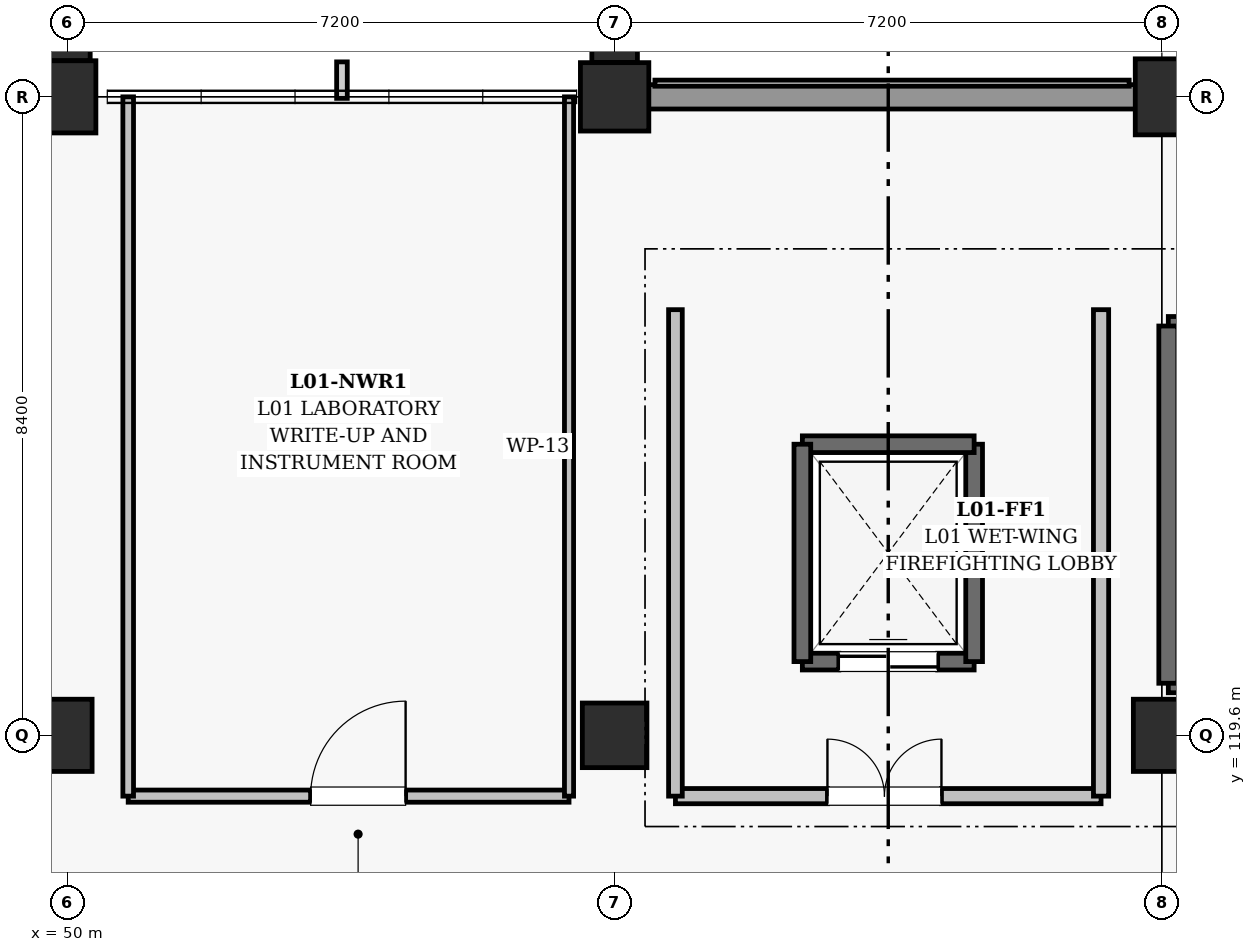
"""IFC4 building model, lengths in metres.
Left out: names, types, materials, properties, quantities, classifications, styles, units other than length and angle.
Written with IfcOpenShell. Run it as: python <this file> out.ifc"""

import sys

from ifc_helpers import new_model, si_unit, direction, frame, frame_2d, origin, origin_2d, place, context, subcontext, project, spatial, rectangle, extrude, element, fill, save


model = new_model("IFC4")
c1 = context("Model", 3, precision=1e-05, world=origin(), true_north=direction((0.0, 1.0)))
c2 = subcontext(c1, "Body", "Model", "MODEL_VIEW")
j1 = project(units=[si_unit("LENGTHUNIT", "METRE"), si_unit("PLANEANGLEUNIT", "RADIAN")], contexts=[c1])
p1 = place(None, origin())
s1 = spatial("IfcSite", under=j1, at=p1, CompositionType="ELEMENT")
p2 = place(p1, origin())
s2 = spatial("IfcBuilding", under=s1, at=p2, CompositionType="ELEMENT")
p3 = place(p2, frame((0.0, 0.0, 5.4)))
s3 = spatial("IfcBuildingStorey", under=s2, at=p3, CompositionType="ELEMENT", Elevation=5.4)
p4 = place(p3, frame((50.0, 119.6, 0.0), z_axis=(0.0, 0.0, 1.0), x_axis=(1.0, 0.0, 0.0)))
e1 = element("IfcColumn", 1, at=p4, inside=s3, PredefinedType="COLUMN", context=c2, shape_type="SweptSolid", body=[
    extrude(rectangle(XDim=0.65, YDim=0.95, at=origin_2d()), origin(), (0.0, 0.0, 1.0), 4.5),
])
p5 = place(p3, frame((50.0, 128.0, 0.0), z_axis=(0.0, 0.0, 1.0), x_axis=(1.0, 0.0, 0.0)))
e2 = element("IfcColumn", 2, at=p5, inside=s3, PredefinedType="COLUMN", context=c2, shape_type="SweptSolid", body=[
    extrude(rectangle(XDim=0.75, YDim=0.95, at=origin_2d()), origin(), (0.0, 0.0, 1.0), 4.5),
])
p6 = place(p3, frame((57.2, 119.6, 0.0), z_axis=(0.0, 0.0, 1.0), x_axis=(1.0, 0.0, 0.0)))
e3 = element("IfcColumn", 3, at=p6, inside=s3, PredefinedType="COLUMN", context=c2, shape_type="SweptSolid", body=[
    extrude(rectangle(XDim=0.85, YDim=0.85, at=origin_2d()), origin(), (0.0, 0.0, 1.0), 4.5),
])
p7 = place(p3, frame((57.2, 128.0, 0.0), z_axis=(0.0, 0.0, 1.0), x_axis=(1.0, 0.0, 0.0)))
e4 = element("IfcColumn", 4, at=p7, inside=s3, PredefinedType="COLUMN", context=c2, shape_type="SweptSolid", body=[
    extrude(rectangle(XDim=0.9, YDim=0.9, at=origin_2d()), origin(), (0.0, 0.0, 1.0), 4.5),
])
p8 = place(p3, frame((64.4, 119.6, 0.0), z_axis=(0.0, 0.0, 1.0), x_axis=(1.0, 0.0, 0.0)))
e5 = element("IfcColumn", 5, at=p8, inside=s3, PredefinedType="COLUMN", context=c2, shape_type="SweptSolid", body=[
    extrude(rectangle(XDim=0.75, YDim=0.95, at=origin_2d()), origin(), (0.0, 0.0, 1.0), 4.5),
])
p9 = place(p3, frame((64.4, 128.0, 0.0), z_axis=(0.0, 0.0, 1.0), x_axis=(1.0, 0.0, 0.0)))
e6 = element("IfcColumn", 6, at=p9, inside=s3, PredefinedType="COLUMN", context=c2, shape_type="SweptSolid", body=[
    extrude(rectangle(XDim=0.7, YDim=1.0, at=origin_2d()), origin(), (0.0, 0.0, 1.0), 4.5),
])
for number, where, z_axis, x_axis in (
    (7, (50.0, 128.903, 0.0), (0.0, 0.0, 1.0), (1.0, 0.0, 0.0)),
    (8, (57.2, 128.878, 0.0), (0.0, 0.0, 1.0), (1.0, 0.0, 0.0)),
):
    element("IfcColumn", number, at=place(p3, frame(where, z_axis=z_axis, x_axis=x_axis)), inside=s3, PredefinedType="PILASTER", context=c2, shape_type="SweptSolid", body=[
        extrude(rectangle(XDim=0.6, YDim=0.85, at=origin_2d()), origin(), (0.0, 0.0, 1.0), 4.5),
    ])
p10 = place(p3, frame((57.63, 128.0, 0.0), z_axis=(0.0, 0.0, 1.0), x_axis=(1.0, 0.0, 0.0)))
e9 = element("IfcWall", 9, at=p10, inside=s3, PredefinedType="SOLIDWALL", context=c2, shape_type="SweptSolid", body=[
    extrude(rectangle(XDim=6.44, YDim=0.32, at=frame_2d((3.22, 0.0))), origin(), (0.0, 0.0, 1.0), 3.455),
])
p11 = place(p3, frame((64.485, 120.285, 0.0), z_axis=(0.0, 0.0, 1.0), x_axis=(1.0, 0.0, 0.0)))
e10 = element("IfcWall", 10, at=p11, inside=s3, PredefinedType="SHEAR", context=c2, shape_type="SweptSolid", body=[
    extrude(rectangle(XDim=10.63, YDim=0.25, at=frame_2d((5.315, 0.0))), origin(), (0.0, 0.0, 1.0), 4.175),
])
p12 = place(p11, frame((0.55, 0.0, 0.0)))
e11 = element("IfcOpeningElement", 11, at=p12, cuts=e10, PredefinedType="OPENING", context=c2, shape_type="SweptSolid", body=[
    extrude(rectangle(XDim=1.2, YDim=2.15, at=frame_2d((0.6, 1.075))), frame((0.0, 0.135, 0.0), z_axis=(0.0, -1.0, 0.0), x_axis=(1.0, 0.0, 0.0)), (0.0, 0.0, 1.0), 0.27),
])
p13 = place(p3, frame((75.115, 124.985, 0.0), z_axis=(0.0, 0.0, 1.0), x_axis=(-1.0, 0.0, 0.0)))
e12 = element("IfcWall", 12, at=p13, inside=s3, PredefinedType="SHEAR", context=c2, shape_type="SweptSolid", body=[
    extrude(rectangle(XDim=10.63, YDim=0.25, at=frame_2d((5.315, 0.0))), origin(), (0.0, 0.0, 1.0), 4.175),
])
p14 = place(p3, frame((64.485, 124.985, 0.0), z_axis=(0.0, 0.0, 1.0), x_axis=(0.0, -1.0, 0.0)))
e13 = element("IfcWall", 13, at=p14, inside=s3, PredefinedType="SHEAR", context=c2, shape_type="SweptSolid", body=[
    extrude(rectangle(XDim=4.7, YDim=0.25, at=frame_2d((2.35, 0.0))), origin(), (0.0, 0.0, 1.0), 4.175),
])
p15 = place(p3, frame((59.67, 120.57, 0.0), z_axis=(0.0, 0.0, 1.0), x_axis=(1.0, 0.0, 0.0)))
e14 = element("IfcWall", 14, at=p15, inside=s3, PredefinedType="SHEAR", context=c2, shape_type="SweptSolid", body=[
    extrude(rectangle(XDim=2.26, YDim=0.22, at=frame_2d((1.13, 0.0))), origin(), (0.0, 0.0, 1.0), 4.175),
])
p16 = place(p15, frame((0.48, 0.0, 0.0)))
e15 = element("IfcOpeningElement", 15, at=p16, cuts=e14, PredefinedType="OPENING", context=c2, shape_type="SweptSolid", body=[
    extrude(rectangle(XDim=1.3, YDim=2.2, at=frame_2d((0.65, 1.1))), frame((0.0, 0.12, 0.0), z_axis=(0.0, -1.0, 0.0), x_axis=(1.0, 0.0, 0.0)), (0.0, 0.0, 1.0), 0.24),
])
p17 = place(p3, frame((61.93, 120.57, 0.0), z_axis=(0.0, 0.0, 1.0), x_axis=(0.0, 1.0, 0.0)))
e16 = element("IfcWall", 16, at=p17, inside=s3, PredefinedType="SHEAR", context=c2, shape_type="SweptSolid", body=[
    extrude(rectangle(XDim=2.86, YDim=0.22, at=frame_2d((1.43, 0.0))), origin(), (0.0, 0.0, 1.0), 4.175),
])
p18 = place(p3, frame((61.93, 123.43, 0.0), z_axis=(0.0, 0.0, 1.0), x_axis=(-1.0, 0.0, 0.0)))
e17 = element("IfcWall", 17, at=p18, inside=s3, PredefinedType="SHEAR", context=c2, shape_type="SweptSolid", body=[
    extrude(rectangle(XDim=2.26, YDim=0.22, at=frame_2d((1.13, 0.0))), origin(), (0.0, 0.0, 1.0), 4.175),
])
p19 = place(p3, frame((59.67, 123.43, 0.0), z_axis=(0.0, 0.0, 1.0), x_axis=(0.0, -1.0, 0.0)))
e18 = element("IfcWall", 18, at=p19, inside=s3, PredefinedType="SHEAR", context=c2, shape_type="SweptSolid", body=[
    extrude(rectangle(XDim=2.86, YDim=0.22, at=frame_2d((1.43, 0.0))), origin(), (0.0, 0.0, 1.0), 4.175),
])
p20 = place(p3, frame((58.0, 118.8, 0.0), z_axis=(0.0, 0.0, 1.0), x_axis=(1.0, 0.0, 0.0)))
e19 = element("IfcWall", 19, at=p20, inside=s3, PredefinedType="SOLIDWALL", context=c2, shape_type="SweptSolid", body=[
    extrude(rectangle(XDim=5.6, YDim=0.2, at=frame_2d((2.8, 0.0))), origin(), (0.0, 0.0, 1.0), 3.54),
])
p21 = place(p20, frame((2.0, 0.0, 0.0)))
e20 = element("IfcOpeningElement", 20, at=p21, cuts=e19, PredefinedType="OPENING", context=c2, shape_type="SweptSolid", body=[
    extrude(rectangle(XDim=1.5, YDim=2.2, at=frame_2d((0.75, 1.1))), frame((0.0, 0.11, 0.0), z_axis=(0.0, -1.0, 0.0), x_axis=(1.0, 0.0, 0.0)), (0.0, 0.0, 1.0), 0.22),
])
p22 = place(p3, frame((58.0, 118.8, 0.0), z_axis=(0.0, 0.0, 1.0), x_axis=(0.0, 1.0, 0.0)))
e21 = element("IfcWall", 21, at=p22, inside=s3, PredefinedType="SOLIDWALL", context=c2, shape_type="SweptSolid", body=[
    extrude(rectangle(XDim=6.4, YDim=0.18, at=frame_2d((3.2, 0.0))), origin(), (0.0, 0.0, 1.0), 3.36),
])
p23 = place(p3, frame((63.6, 118.8, 0.0), z_axis=(0.0, 0.0, 1.0), x_axis=(0.0, 1.0, 0.0)))
e22 = element("IfcWall", 22, at=p23, inside=s3, PredefinedType="SOLIDWALL", context=c2, shape_type="SweptSolid", body=[
    extrude(rectangle(XDim=6.4, YDim=0.2, at=frame_2d((3.2, 0.0))), origin(), (0.0, 0.0, 1.0), 3.36),
])
p24 = place(p3, frame((50.8, 118.8, 0.0), z_axis=(0.0, 0.0, 1.0), x_axis=(1.0, 0.0, 0.0)))
e23 = element("IfcWall", 23, at=p24, inside=s3, PredefinedType="PARTITIONING", context=c2, shape_type="SweptSolid", body=[
    extrude(rectangle(XDim=5.8, YDim=0.16, at=frame_2d((2.9, 0.0))), origin(), (0.0, 0.0, 1.0), 3.54),
])
p25 = place(p24, frame((2.4, 0.0, 0.0)))
e24 = element("IfcOpeningElement", 24, at=p25, cuts=e23, PredefinedType="OPENING", context=c2, shape_type="SweptSolid", body=[
    extrude(rectangle(XDim=1.25, YDim=2.2, at=frame_2d((0.625, 1.1))), frame((0.0, 0.09, 0.0), z_axis=(0.0, -1.0, 0.0), x_axis=(1.0, 0.0, 0.0)), (0.0, 0.0, 1.0), 0.18),
])
p26 = place(p3, frame((50.8, 118.8, 0.0), z_axis=(0.0, 0.0, 1.0), x_axis=(0.0, 1.0, 0.0)))
e25 = element("IfcWall", 25, at=p26, inside=s3, PredefinedType="PARTITIONING", context=c2, shape_type="SweptSolid", body=[
    extrude(rectangle(XDim=9.2, YDim=0.14, at=frame_2d((4.6, 0.0))), origin(), (0.0, 0.0, 1.0), 3.41),
])
p27 = place(p3, frame((56.6, 118.8, 0.0), z_axis=(0.0, 0.0, 1.0), x_axis=(0.0, 1.0, 0.0)))
e26 = element("IfcWall", 26, at=p27, inside=s3, PredefinedType="PARTITIONING", context=c2, shape_type="SweptSolid", body=[
    extrude(rectangle(XDim=9.2, YDim=0.12, at=frame_2d((4.6, 0.0))), origin(), (0.0, 0.0, 1.0), 3.41),
])
p28 = place(p16, origin())
e27 = element("IfcDoor", 27, at=p28, inside=s3, OperationType="DOUBLE_DOOR_SLIDING", PredefinedType="DOOR", context=c2, shape_type="SweptSolid", body=[
    extrude(rectangle(XDim=1.3, YDim=2.2, at=frame_2d((0.65, 1.1))), frame((0.0, 0.025, 0.0), z_axis=(0.0, -1.0, 0.0), x_axis=(1.0, 0.0, 0.0)), (0.0, 0.0, 1.0), 0.05),
])
fill(e15, e27)
p29 = place(p21, origin())
e28 = element("IfcDoor", 28, at=p29, inside=s3, OperationType="DOUBLE_DOOR_SINGLE_SWING", PredefinedType="DOOR", context=c2, shape_type="SweptSolid", body=[
    extrude(rectangle(XDim=1.5, YDim=2.2, at=frame_2d((0.75, 1.1))), frame((0.0, 0.025, 0.0), z_axis=(0.0, -1.0, 0.0), x_axis=(1.0, 0.0, 0.0)), (0.0, 0.0, 1.0), 0.05),
])
fill(e20, e28)
p30 = place(p25, origin())
e29 = element("IfcDoor", 29, at=p30, inside=s3, OperationType="SINGLE_SWING_RIGHT", PredefinedType="DOOR", context=c2, shape_type="SweptSolid", body=[
    extrude(rectangle(XDim=1.25, YDim=2.2, at=frame_2d((0.625, 1.1))), frame((0.0, 0.025, 0.0), z_axis=(0.0, -1.0, 0.0), x_axis=(1.0, 0.0, 0.0)), (0.0, 0.0, 1.0), 0.05),
])
fill(e24, e29)
save(model, sys.argv[1])
